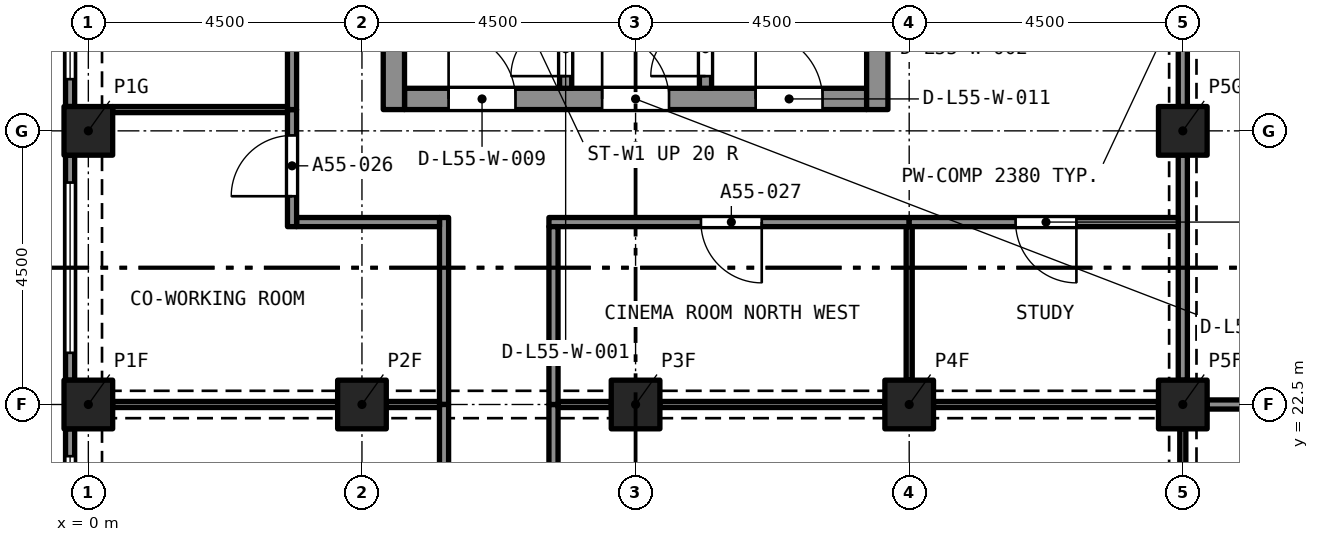
"""IFC4 building model, lengths in metres.
Left out: names, types, materials, properties, quantities, classifications, styles, units other than length and angle.
Written with IfcOpenShell. Run it as: python <this file> out.ifc"""

import sys

from ifc_helpers import new_model, si_unit, direction, frame, frame_2d, origin, origin_2d, place, context, subcontext, project, spatial, rectangle, extrude, element, fill, save


model = new_model("IFC4")
c1 = context("Model", 3, precision=1e-05, world=origin(), true_north=direction((0.0, 1.0)))
c2 = subcontext(c1, "Body", "Model", "MODEL_VIEW")
j1 = project(units=[si_unit("LENGTHUNIT", "METRE"), si_unit("PLANEANGLEUNIT", "RADIAN")], contexts=[c1])
p1 = place(None, origin())
s1 = spatial("IfcSite", under=j1, at=p1, CompositionType="ELEMENT")
p2 = place(p1, origin())
s2 = spatial("IfcBuilding", under=s1, at=p2, CompositionType="ELEMENT")
p3 = place(p2, frame((0.0, 0.0, 198.7)))
s3 = spatial("IfcBuildingStorey", under=s2, at=p3, CompositionType="ELEMENT", Elevation=198.7)
for number, where, z_axis, x_axis in (
    (1, (0.0, 22.5, 0.0), (0.0, 0.0, 1.0), (1.0, 0.0, 0.0)),
    (2, (4.5, 22.5, 0.0), (0.0, 0.0, 1.0), (1.0, 0.0, 0.0)),
    (3, (9.0, 22.5, 0.0), (0.0, 0.0, 1.0), (1.0, 0.0, 0.0)),
    (4, (13.5, 22.5, 0.0), (0.0, 0.0, 1.0), (1.0, 0.0, 0.0)),
    (5, (18.0, 22.5, 0.0), (0.0, 0.0, 1.0), (1.0, 0.0, 0.0)),
    (6, (0.0, 27.0, 0.0), (0.0, 0.0, 1.0), (1.0, 0.0, 0.0)),
    (7, (18.0, 27.0, 0.0), (0.0, 0.0, 1.0), (1.0, 0.0, 0.0)),
):
    element("IfcColumn", number, at=place(p3, frame(where, z_axis=z_axis, x_axis=x_axis)), inside=s3, PredefinedType="COLUMN", context=c2, shape_type="SweptSolid", body=[
        extrude(rectangle(XDim=0.8, YDim=0.8, at=origin_2d()), origin(), (0.0, 0.0, 1.0), 3.2),
    ])
p4 = place(p3, frame((5.2, 27.525, 0.0), z_axis=(0.0, 0.0, 1.0), x_axis=(1.0, 0.0, 0.0)))
e8 = element("IfcWall", 8, at=p4, inside=s3, PredefinedType="SOLIDWALL", context=c2, shape_type="SweptSolid", body=[
    extrude(rectangle(XDim=7.6, YDim=0.35, at=frame_2d((3.8, 0.0))), origin(), (0.0, 0.0, 1.0), 3.2),
])
p5 = place(p4, frame((0.725, 0.0, 0.0)))
e9 = element("IfcOpeningElement", 9, at=p5, cuts=e8, PredefinedType="OPENING", context=c2, shape_type="SweptSolid", body=[
    extrude(rectangle(XDim=1.1, YDim=2.1, at=frame_2d((0.55, 1.05))), frame((0.0, 0.185, 0.0), z_axis=(0.0, -1.0, 0.0), x_axis=(1.0, 0.0, 0.0)), (0.0, 0.0, 1.0), 0.37),
])
p6 = place(p4, frame((3.25, 0.0, 0.0)))
e10 = element("IfcOpeningElement", 10, at=p6, cuts=e8, PredefinedType="OPENING", context=c2, shape_type="SweptSolid", body=[
    extrude(rectangle(XDim=1.1, YDim=2.1, at=frame_2d((0.55, 1.05))), frame((0.0, 0.185, 0.0), z_axis=(0.0, -1.0, 0.0), x_axis=(1.0, 0.0, 0.0)), (0.0, 0.0, 1.0), 0.37),
])
p7 = place(p4, frame((5.775, 0.0, 0.0)))
e11 = element("IfcOpeningElement", 11, at=p7, cuts=e8, PredefinedType="OPENING", context=c2, shape_type="SweptSolid", body=[
    extrude(rectangle(XDim=1.1, YDim=2.1, at=frame_2d((0.55, 1.05))), frame((0.0, 0.185, 0.0), z_axis=(0.0, -1.0, 0.0), x_axis=(1.0, 0.0, 0.0)), (0.0, 0.0, 1.0), 0.37),
])
p8 = place(p3, frame((5.025, 27.35, 0.0), z_axis=(0.0, 0.0, 1.0), x_axis=(0.0, 1.0, 0.0)))
e12 = element("IfcWall", 12, at=p8, inside=s3, PredefinedType="SOLIDWALL", context=c2, shape_type="SweptSolid", body=[
    extrude(rectangle(XDim=12.8, YDim=0.35, at=frame_2d((6.4, 0.0))), origin(), (0.0, 0.0, 1.0), 3.2),
])
p9 = place(p8, frame((8.6, 0.0, 0.0)))
e13 = element("IfcOpeningElement", 13, at=p9, cuts=e12, PredefinedType="OPENING", context=c2, shape_type="SweptSolid", body=[
    extrude(rectangle(XDim=1.2, YDim=2.1, at=frame_2d((0.6, 1.05))), frame((0.0, 0.185, 0.0), z_axis=(0.0, -1.0, 0.0), x_axis=(1.0, 0.0, 0.0)), (0.0, 0.0, 1.0), 0.37),
])
p10 = place(p3, frame((12.975, 27.35, 0.0), z_axis=(0.0, 0.0, 1.0), x_axis=(0.0, 1.0, 0.0)))
e14 = element("IfcWall", 14, at=p10, inside=s3, PredefinedType="SOLIDWALL", context=c2, shape_type="SweptSolid", body=[
    extrude(rectangle(XDim=12.8, YDim=0.35, at=frame_2d((6.4, 0.0))), origin(), (0.0, 0.0, 1.0), 3.2),
])
p11 = place(p10, frame((10.75, 0.0, 0.0)))
e15 = element("IfcOpeningElement", 15, at=p11, cuts=e14, PredefinedType="OPENING", context=c2, shape_type="SweptSolid", body=[
    extrude(rectangle(XDim=1.1, YDim=2.1, at=frame_2d((0.55, 1.05))), frame((0.0, 0.185, 0.0), z_axis=(0.0, -1.0, 0.0), x_axis=(1.0, 0.0, 0.0)), (0.0, 0.0, 1.0), 0.37),
])
p12 = place(p10, frame((8.6, 0.0, 0.0)))
e16 = element("IfcOpeningElement", 16, at=p12, cuts=e14, PredefinedType="OPENING", context=c2, shape_type="SweptSolid", body=[
    extrude(rectangle(XDim=1.2, YDim=2.1, at=frame_2d((0.6, 1.05))), frame((0.0, 0.185, 0.0), z_axis=(0.0, -1.0, 0.0), x_axis=(1.0, 0.0, 0.0)), (0.0, 0.0, 1.0), 0.37),
])
p13 = place(p3, frame((-0.3, 27.4, 0.0), z_axis=(0.0, 0.0, 1.0), x_axis=(0.0, 1.0, 0.0)))
e17 = element("IfcWall", 17, at=p13, inside=s3, PredefinedType="SOLIDWALL", context=c2, shape_type="SweptSolid", body=[
    extrude(rectangle(XDim=3.7, YDim=0.15, at=frame_2d((1.85, 0.0))), origin(), (0.0, 0.0, 1.0), 3.2),
])
p14 = place(p13, frame((0.45, 0.0, 0.45)))
e18 = element("IfcOpeningElement", 18, at=p14, cuts=e17, PredefinedType="OPENING", context=c2, shape_type="SweptSolid", body=[
    extrude(rectangle(XDim=2.8, YDim=1.95, at=frame_2d((1.4, 0.975))), frame((0.0, 0.085, 0.0), z_axis=(0.0, -1.0, 0.0), x_axis=(1.0, 0.0, 0.0)), (0.0, 0.0, 1.0), 0.17),
])
p15 = place(p3, frame((-0.3, 22.9, 0.0), z_axis=(0.0, 0.0, 1.0), x_axis=(0.0, 1.0, 0.0)))
e19 = element("IfcWall", 19, at=p15, inside=s3, PredefinedType="SOLIDWALL", context=c2, shape_type="SweptSolid", body=[
    extrude(rectangle(XDim=3.7, YDim=0.15, at=frame_2d((1.85, 0.0))), origin(), (0.0, 0.0, 1.0), 3.2),
])
p16 = place(p15, frame((0.45, 0.0, 0.45)))
e20 = element("IfcOpeningElement", 20, at=p16, cuts=e19, PredefinedType="OPENING", context=c2, shape_type="SweptSolid", body=[
    extrude(rectangle(XDim=2.8, YDim=1.95, at=frame_2d((1.4, 0.975))), frame((0.0, 0.085, 0.0), z_axis=(0.0, -1.0, 0.0), x_axis=(1.0, 0.0, 0.0)), (0.0, 0.0, 1.0), 0.17),
])
p17 = place(p3, frame((-0.3, 18.4, 0.0), z_axis=(0.0, 0.0, 1.0), x_axis=(0.0, 1.0, 0.0)))
e21 = element("IfcWall", 21, at=p17, inside=s3, PredefinedType="SOLIDWALL", context=c2, shape_type="SweptSolid", body=[
    extrude(rectangle(XDim=3.7, YDim=0.15, at=frame_2d((1.85, 0.0))), origin(), (0.0, 0.0, 1.0), 3.2),
])
p18 = place(p17, frame((0.45, 0.0, 0.45)))
e22 = element("IfcOpeningElement", 22, at=p18, cuts=e21, PredefinedType="OPENING", context=c2, shape_type="SweptSolid", body=[
    extrude(rectangle(XDim=2.8, YDim=1.95, at=frame_2d((1.4, 0.975))), frame((0.0, 0.085, 0.0), z_axis=(0.0, -1.0, 0.0), x_axis=(1.0, 0.0, 0.0)), (0.0, 0.0, 1.0), 0.17),
])
p19 = place(p3, frame((18.0, 18.4, 0.0), z_axis=(0.0, 0.0, 1.0), x_axis=(0.0, 1.0, 0.0)))
e23 = element("IfcWall", 23, at=p19, inside=s3, PredefinedType="PARTITIONING", context=c2, shape_type="SweptSolid", body=[
    extrude(rectangle(XDim=3.7, YDim=0.1, at=frame_2d((1.85, 0.0))), origin(), (0.0, 0.0, 1.0), 2.38),
])
p20 = place(p3, frame((7.65, 22.5, 0.0), z_axis=(0.0, 0.0, 1.0), x_axis=(0.0, -1.0, 0.0)))
e24 = element("IfcWall", 24, at=p20, inside=s3, PredefinedType="PARTITIONING", context=c2, shape_type="SweptSolid", body=[
    extrude(rectangle(XDim=6.8, YDim=0.15, at=frame_2d((3.4, 0.0))), origin(), (0.0, 0.0, 1.0), 2.7),
])
p21 = place(p20, frame((2.9, 0.0, 0.0)))
e25 = element("IfcOpeningElement", 25, at=p21, cuts=e24, PredefinedType="OPENING", context=c2, shape_type="SweptSolid", body=[
    extrude(rectangle(XDim=1.0, YDim=2.1, at=frame_2d((0.5, 1.05))), frame((0.0, 0.085, 0.0), z_axis=(0.0, -1.0, 0.0), x_axis=(1.0, 0.0, 0.0)), (0.0, 0.0, 1.0), 0.17),
])
p22 = place(p3, frame((7.725, 22.5, 0.0), z_axis=(0.0, 0.0, 1.0), x_axis=(1.0, 0.0, 0.0)))
e26 = element("IfcWall", 26, at=p22, inside=s3, PredefinedType="PARTITIONING", context=c2, shape_type="SweptSolid", body=[
    extrude(rectangle(XDim=0.875, YDim=0.1, at=frame_2d((0.438, 0.0))), origin(), (0.0, 0.0, 1.0), 2.38),
])
for number, where, z_axis, x_axis in (
    (27, (9.4, 22.5, 0.0), (0.0, 0.0, 1.0), (1.0, 0.0, 0.0)),
    (28, (13.9, 22.5, 0.0), (0.0, 0.0, 1.0), (1.0, 0.0, 0.0)),
):
    element("IfcWall", number, at=place(p3, frame(where, z_axis=z_axis, x_axis=x_axis)), inside=s3, PredefinedType="PARTITIONING", context=c2, shape_type="SweptSolid", body=[
        extrude(rectangle(XDim=3.7, YDim=0.1, at=frame_2d((1.85, 0.0))), origin(), (0.0, 0.0, 1.0), 2.38),
    ])
p23 = place(p3, frame((18.4, 22.5, 0.0), z_axis=(0.0, 0.0, 1.0), x_axis=(1.0, 0.0, 0.0)))
e29 = element("IfcWall", 29, at=p23, inside=s3, PredefinedType="PARTITIONING", context=c2, shape_type="SweptSolid", body=[
    extrude(rectangle(XDim=5.375, YDim=0.15, at=frame_2d((2.688, 0.0))), origin(), (0.0, 0.0, 1.0), 2.7),
])
for number, where, z_axis, x_axis in (
    (30, (18.0, 27.4, 0.0), (0.0, 0.0, 1.0), (0.0, 1.0, 0.0)),
    (31, (18.0, 22.9, 0.0), (0.0, 0.0, 1.0), (0.0, 1.0, 0.0)),
):
    element("IfcWall", number, at=place(p3, frame(where, z_axis=z_axis, x_axis=x_axis)), inside=s3, PredefinedType="PARTITIONING", context=c2, shape_type="SweptSolid", body=[
        extrude(rectangle(XDim=3.7, YDim=0.15, at=frame_2d((1.85, 0.0))), origin(), (0.0, 0.0, 1.0), 2.38),
    ])
p24 = place(p3, frame((5.85, 22.5, 0.0), z_axis=(0.0, 0.0, 1.0), x_axis=(0.0, 1.0, 0.0)))
e32 = element("IfcWall", 32, at=p24, inside=s3, PredefinedType="PARTITIONING", context=c2, shape_type="SweptSolid", body=[
    extrude(rectangle(XDim=3.075, YDim=0.15, at=frame_2d((1.538, 0.0))), origin(), (0.0, 0.0, 1.0), 2.7),
])
p25 = place(p3, frame((3.425, 25.5, 0.0), z_axis=(0.0, 0.0, 1.0), x_axis=(1.0, 0.0, 0.0)))
e33 = element("IfcWall", 33, at=p25, inside=s3, PredefinedType="PARTITIONING", context=c2, shape_type="SweptSolid", body=[
    extrude(rectangle(XDim=2.35, YDim=0.15, at=frame_2d((1.175, 0.0))), origin(), (0.0, 0.0, 1.0), 2.7),
])
p26 = place(p3, frame((3.35, 25.425, 0.0), z_axis=(0.0, 0.0, 1.0), x_axis=(0.0, 1.0, 0.0)))
e34 = element("IfcWall", 34, at=p26, inside=s3, PredefinedType="PARTITIONING", context=c2, shape_type="SweptSolid", body=[
    extrude(rectangle(XDim=1.925, YDim=0.15, at=frame_2d((0.962, 0.0))), origin(), (0.0, 0.0, 1.0), 2.7),
])
p27 = place(p26, frame((0.5, 0.0, 0.0)))
e35 = element("IfcOpeningElement", 35, at=p27, cuts=e34, PredefinedType="OPENING", context=c2, shape_type="SweptSolid", body=[
    extrude(rectangle(XDim=1.0, YDim=2.1, at=frame_2d((0.5, 1.05))), frame((0.0, 0.085, 0.0), z_axis=(0.0, -1.0, 0.0), x_axis=(1.0, 0.0, 0.0)), (0.0, 0.0, 1.0), 0.17),
])
p28 = place(p3, frame((13.5, 25.5, 0.0), z_axis=(0.0, 0.0, 1.0), x_axis=(-1.0, 0.0, 0.0)))
e36 = element("IfcWall", 36, at=p28, inside=s3, PredefinedType="PARTITIONING", context=c2, shape_type="SweptSolid", body=[
    extrude(rectangle(XDim=5.925, YDim=0.15, at=frame_2d((2.962, 0.0))), origin(), (0.0, 0.0, 1.0), 2.7),
])
p29 = place(p28, frame((2.425, 0.0, 0.0)))
e37 = element("IfcOpeningElement", 37, at=p29, cuts=e36, PredefinedType="OPENING", context=c2, shape_type="SweptSolid", body=[
    extrude(rectangle(XDim=1.0, YDim=2.1, at=frame_2d((0.5, 1.05))), frame((0.0, 0.085, 0.0), z_axis=(0.0, -1.0, 0.0), x_axis=(1.0, 0.0, 0.0)), (0.0, 0.0, 1.0), 0.17),
])
p30 = place(p3, frame((7.65, 22.5, 0.0), z_axis=(0.0, 0.0, 1.0), x_axis=(0.0, 1.0, 0.0)))
e38 = element("IfcWall", 38, at=p30, inside=s3, PredefinedType="PARTITIONING", context=c2, shape_type="SweptSolid", body=[
    extrude(rectangle(XDim=2.925, YDim=0.15, at=frame_2d((1.462, 0.0))), origin(), (0.0, 0.0, 1.0), 2.7),
])
p31 = place(p3, frame((17.925, 25.5, 0.0), z_axis=(0.0, 0.0, 1.0), x_axis=(-1.0, 0.0, 0.0)))
e39 = element("IfcWall", 39, at=p31, inside=s3, PredefinedType="PARTITIONING", context=c2, shape_type="SweptSolid", body=[
    extrude(rectangle(XDim=4.425, YDim=0.15, at=frame_2d((2.212, 0.0))), origin(), (0.0, 0.0, 1.0), 2.7),
])
p32 = place(p31, frame((1.675, 0.0, 0.0)))
e40 = element("IfcOpeningElement", 40, at=p32, cuts=e39, PredefinedType="OPENING", context=c2, shape_type="SweptSolid", body=[
    extrude(rectangle(XDim=1.0, YDim=2.1, at=frame_2d((0.5, 1.05))), frame((0.0, 0.085, 0.0), z_axis=(0.0, -1.0, 0.0), x_axis=(1.0, 0.0, 0.0)), (0.0, 0.0, 1.0), 0.17),
])
p33 = place(p3, frame((3.35, 27.35, 0.0), z_axis=(0.0, 0.0, 1.0), x_axis=(0.0, 1.0, 0.0)))
e41 = element("IfcWall", 41, at=p33, inside=s3, PredefinedType="PARTITIONING", context=c2, shape_type="SweptSolid", body=[
    extrude(rectangle(XDim=12.675, YDim=0.15, at=frame_2d((6.337, 0.0))), origin(), (0.0, 0.0, 1.0), 2.7),
])
p34 = place(p33, frame((5.9, 0.0, 0.0)))
e42 = element("IfcOpeningElement", 42, at=p34, cuts=e41, PredefinedType="OPENING", context=c2, shape_type="SweptSolid", body=[
    extrude(rectangle(XDim=1.0, YDim=2.1, at=frame_2d((0.5, 1.05))), frame((0.0, 0.085, 0.0), z_axis=(0.0, -1.0, 0.0), x_axis=(1.0, 0.0, 0.0)), (0.0, 0.0, 1.0), 0.17),
])
p35 = place(p3, frame((5.85, 13.025, 0.0), z_axis=(0.0, 0.0, 1.0), x_axis=(0.0, 1.0, 0.0)))
e43 = element("IfcWall", 43, at=p35, inside=s3, PredefinedType="PARTITIONING", context=c2, shape_type="SweptSolid", body=[
    extrude(rectangle(XDim=9.475, YDim=0.15, at=frame_2d((4.738, 0.0))), origin(), (0.0, 0.0, 1.0), 2.7),
])
p36 = place(p35, frame((4.275, 0.0, 0.0)))
e44 = element("IfcOpeningElement", 44, at=p36, cuts=e43, PredefinedType="OPENING", context=c2, shape_type="SweptSolid", body=[
    extrude(rectangle(XDim=1.0, YDim=2.1, at=frame_2d((0.5, 1.05))), frame((0.0, 0.085, 0.0), z_axis=(0.0, -1.0, 0.0), x_axis=(1.0, 0.0, 0.0)), (0.0, 0.0, 1.0), 0.17),
])
p37 = place(p3, frame((0.4, 27.35, 0.0), z_axis=(0.0, 0.0, 1.0), x_axis=(1.0, 0.0, 0.0)))
e45 = element("IfcWall", 45, at=p37, inside=s3, PredefinedType="PARTITIONING", context=c2, shape_type="SweptSolid", body=[
    extrude(rectangle(XDim=2.875, YDim=0.1, at=frame_2d((1.438, 0.0))), origin(), (0.0, 0.0, 1.0), 2.7),
])
p38 = place(p3, frame((4.9, 22.5, 0.0), z_axis=(0.0, 0.0, 1.0), x_axis=(1.0, 0.0, 0.0)))
e46 = element("IfcWall", 46, at=p38, inside=s3, PredefinedType="PARTITIONING", context=c2, shape_type="SweptSolid", body=[
    extrude(rectangle(XDim=0.875, YDim=0.1, at=frame_2d((0.438, 0.0))), origin(), (0.0, 0.0, 1.0), 2.38),
])
p39 = place(p3, frame((0.4, 22.5, 0.0), z_axis=(0.0, 0.0, 1.0), x_axis=(1.0, 0.0, 0.0)))
e47 = element("IfcWall", 47, at=p39, inside=s3, PredefinedType="PARTITIONING", context=c2, shape_type="SweptSolid", body=[
    extrude(rectangle(XDim=3.7, YDim=0.1, at=frame_2d((1.85, 0.0))), origin(), (0.0, 0.0, 1.0), 2.38),
])
p40 = place(p3, frame((13.5, 22.9, 0.0), z_axis=(0.0, 0.0, 1.0), x_axis=(0.0, 1.0, 0.0)))
e48 = element("IfcWall", 48, at=p40, inside=s3, PredefinedType="PARTITIONING", context=c2, shape_type="SweptSolid", body=[
    extrude(rectangle(XDim=2.525, YDim=0.1, at=frame_2d((1.263, 0.0))), origin(), (0.0, 0.0, 1.0), 2.7),
])
p41 = place(p3, frame((7.85, 27.7, 0.0), z_axis=(0.0, 0.0, 1.0), x_axis=(0.0, 1.0, 0.0)))
e49 = element("IfcWall", 49, at=p41, inside=s3, PredefinedType="SOLIDWALL", context=c2, shape_type="SweptSolid", body=[
    extrude(rectangle(XDim=5.4, YDim=0.2, at=frame_2d((2.7, 0.0))), origin(), (0.0, 0.0, 1.0), 2.7),
])
p42 = place(p41, frame((0.2, 0.0, 0.0)))
e50 = element("IfcOpeningElement", 50, at=p42, cuts=e49, PredefinedType="OPENING", context=c2, shape_type="SweptSolid", body=[
    extrude(rectangle(XDim=0.9, YDim=2.1, at=frame_2d((0.45, 1.05))), frame((0.0, 0.11, 0.0), z_axis=(0.0, -1.0, 0.0), x_axis=(1.0, 0.0, 0.0)), (0.0, 0.0, 1.0), 0.22),
])
p43 = place(p3, frame((10.15, 27.7, 0.0), z_axis=(0.0, 0.0, 1.0), x_axis=(0.0, 1.0, 0.0)))
e51 = element("IfcWall", 51, at=p43, inside=s3, PredefinedType="SOLIDWALL", context=c2, shape_type="SweptSolid", body=[
    extrude(rectangle(XDim=5.4, YDim=0.2, at=frame_2d((2.7, 0.0))), origin(), (0.0, 0.0, 1.0), 2.7),
])
p44 = place(p43, frame((0.2, 0.0, 0.0)))
e52 = element("IfcOpeningElement", 52, at=p44, cuts=e51, PredefinedType="OPENING", context=c2, shape_type="SweptSolid", body=[
    extrude(rectangle(XDim=0.9, YDim=2.1, at=frame_2d((0.45, 1.05))), frame((0.0, 0.11, 0.0), z_axis=(0.0, -1.0, 0.0), x_axis=(1.0, 0.0, 0.0)), (0.0, 0.0, 1.0), 0.22),
])
p45 = place(p14, origin())
e53 = element("IfcWindow", 53, at=p45, inside=s3, PartitioningType="SINGLE_PANEL", PredefinedType="WINDOW", context=c2, shape_type="SweptSolid", body=[
    extrude(rectangle(XDim=2.8, YDim=1.95, at=frame_2d((1.4, 0.975))), frame((0.0, 0.03, 0.0), z_axis=(0.0, -1.0, 0.0), x_axis=(1.0, 0.0, 0.0)), (0.0, 0.0, 1.0), 0.06),
])
fill(e18, e53)
p46 = place(p16, origin())
e54 = element("IfcWindow", 54, at=p46, inside=s3, PartitioningType="SINGLE_PANEL", PredefinedType="WINDOW", context=c2, shape_type="SweptSolid", body=[
    extrude(rectangle(XDim=2.8, YDim=1.95, at=frame_2d((1.4, 0.975))), frame((0.0, 0.03, 0.0), z_axis=(0.0, -1.0, 0.0), x_axis=(1.0, 0.0, 0.0)), (0.0, 0.0, 1.0), 0.06),
])
fill(e20, e54)
p47 = place(p18, origin())
e55 = element("IfcWindow", 55, at=p47, inside=s3, PartitioningType="SINGLE_PANEL", PredefinedType="WINDOW", context=c2, shape_type="SweptSolid", body=[
    extrude(rectangle(XDim=2.8, YDim=1.95, at=frame_2d((1.4, 0.975))), frame((0.0, 0.03, 0.0), z_axis=(0.0, -1.0, 0.0), x_axis=(1.0, 0.0, 0.0)), (0.0, 0.0, 1.0), 0.06),
])
fill(e22, e55)
p48 = place(p27, origin())
e56 = element("IfcDoor", 56, at=p48, inside=s3, OperationType="SINGLE_SWING_RIGHT", PredefinedType="DOOR", context=c2, shape_type="SweptSolid", body=[
    extrude(rectangle(XDim=1.0, YDim=2.1, at=frame_2d((0.5, 1.05))), frame((0.0, 0.025, 0.0), z_axis=(0.0, -1.0, 0.0), x_axis=(1.0, 0.0, 0.0)), (0.0, 0.0, 1.0), 0.05),
])
fill(e35, e56)
p49 = place(p29, origin())
e57 = element("IfcDoor", 57, at=p49, inside=s3, OperationType="SINGLE_SWING_LEFT", PredefinedType="DOOR", context=c2, shape_type="SweptSolid", body=[
    extrude(rectangle(XDim=1.0, YDim=2.1, at=frame_2d((0.5, 1.05))), frame((0.0, 0.025, 0.0), z_axis=(0.0, -1.0, 0.0), x_axis=(1.0, 0.0, 0.0)), (0.0, 0.0, 1.0), 0.05),
])
fill(e37, e57)
p50 = place(p32, origin())
e58 = element("IfcDoor", 58, at=p50, inside=s3, OperationType="SINGLE_SWING_LEFT", PredefinedType="DOOR", context=c2, shape_type="SweptSolid", body=[
    extrude(rectangle(XDim=1.0, YDim=2.1, at=frame_2d((0.5, 1.05))), frame((0.0, 0.025, 0.0), z_axis=(0.0, -1.0, 0.0), x_axis=(1.0, 0.0, 0.0)), (0.0, 0.0, 1.0), 0.05),
])
fill(e40, e58)
p51 = place(p42, origin())
e59 = element("IfcDoor", 59, at=p51, inside=s3, OperationType="SINGLE_SWING_LEFT", PredefinedType="DOOR", context=c2, shape_type="SweptSolid", body=[
    extrude(rectangle(XDim=0.9, YDim=2.1, at=frame_2d((0.45, 1.05))), frame((0.0, 0.025, 0.0), z_axis=(0.0, -1.0, 0.0), x_axis=(1.0, 0.0, 0.0)), (0.0, 0.0, 1.0), 0.05),
])
fill(e50, e59)
p52 = place(p44, origin())
e60 = element("IfcDoor", 60, at=p52, inside=s3, OperationType="SINGLE_SWING_LEFT", PredefinedType="DOOR", context=c2, shape_type="SweptSolid", body=[
    extrude(rectangle(XDim=0.9, YDim=2.1, at=frame_2d((0.45, 1.05))), frame((0.0, 0.025, 0.0), z_axis=(0.0, -1.0, 0.0), x_axis=(1.0, 0.0, 0.0)), (0.0, 0.0, 1.0), 0.05),
])
fill(e52, e60)
p53 = place(p5, origin())
e61 = element("IfcDoor", 61, at=p53, inside=s3, OperationType="SINGLE_SWING_LEFT", PredefinedType="DOOR", context=c2, shape_type="SweptSolid", body=[
    extrude(rectangle(XDim=1.1, YDim=2.1, at=frame_2d((0.55, 1.05))), frame((0.0, 0.025, 0.0), z_axis=(0.0, -1.0, 0.0), x_axis=(1.0, 0.0, 0.0)), (0.0, 0.0, 1.0), 0.05),
])
fill(e9, e61)
p54 = place(p6, origin())
e62 = element("IfcDoor", 62, at=p54, inside=s3, OperationType="SINGLE_SWING_LEFT", PredefinedType="DOOR", context=c2, shape_type="SweptSolid", body=[
    extrude(rectangle(XDim=1.1, YDim=2.1, at=frame_2d((0.55, 1.05))), frame((0.0, 0.025, 0.0), z_axis=(0.0, -1.0, 0.0), x_axis=(1.0, 0.0, 0.0)), (0.0, 0.0, 1.0), 0.05),
])
fill(e10, e62)
p55 = place(p7, origin())
e63 = element("IfcDoor", 63, at=p55, inside=s3, OperationType="SINGLE_SWING_LEFT", PredefinedType="DOOR", context=c2, shape_type="SweptSolid", body=[
    extrude(rectangle(XDim=1.1, YDim=2.1, at=frame_2d((0.55, 1.05))), frame((0.0, 0.025, 0.0), z_axis=(0.0, -1.0, 0.0), x_axis=(1.0, 0.0, 0.0)), (0.0, 0.0, 1.0), 0.05),
])
fill(e11, e63)
save(model, sys.argv[1])
